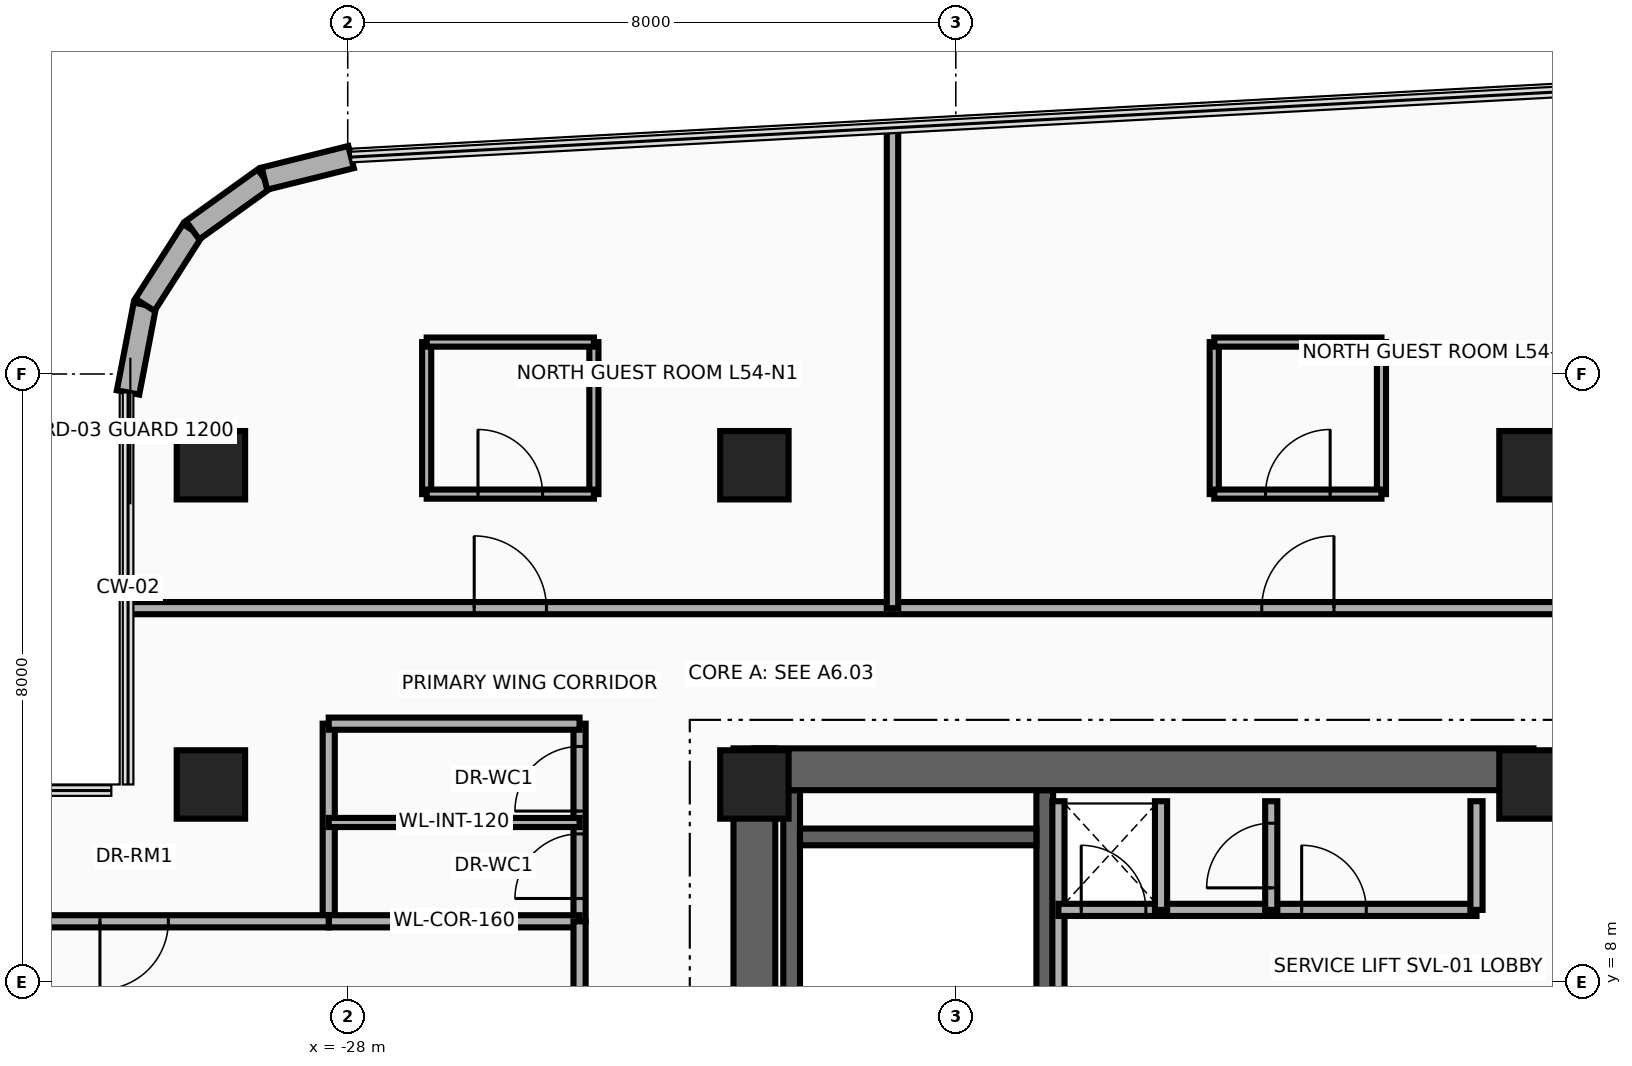
"""IFC4 building model, lengths in metres.
Left out: names, types, materials, properties, quantities, classifications, styles, units other than length and angle.
Written with IfcOpenShell. Run it as: python <this file> out.ifc"""

import sys

from ifc_helpers import new_model, si_unit, direction, frame, frame_2d, origin, origin_2d, place, context, subcontext, project, spatial, rectangle, extrude, source, transform, mapped, element, fill, save


model = new_model("IFC4")
c1 = context("Model", 3, precision=1e-05, world=origin(), true_north=direction((0.0, 1.0)))
c2 = subcontext(c1, "Body", "Model", "MODEL_VIEW")
j1 = project(units=[si_unit("LENGTHUNIT", "METRE"), si_unit("PLANEANGLEUNIT", "RADIAN")], contexts=[c1])
p1 = place(None, origin())
s1 = spatial("IfcSite", under=j1, at=p1, CompositionType="ELEMENT")
p2 = place(p1, origin())
s2 = spatial("IfcBuilding", under=s1, at=p2, CompositionType="ELEMENT")
p3 = place(p2, frame((0.0, 0.0, 212.5)))
s3 = spatial("IfcBuildingStorey", under=s2, at=p3, CompositionType="ELEMENT", Elevation=212.5)
for number, where, z_axis, x_axis in (
    (1, (-22.16, 1.78, 0.0), (0.0, 0.0, 1.0), (0.0, 1.0, 0.0)),
    (2, (-18.83, 1.78, 0.0), (0.0, 0.0, 1.0), (0.0, 1.0, 0.0)),
):
    element("IfcWall", number, at=place(p3, frame(where, z_axis=z_axis, x_axis=x_axis)), inside=s3, PredefinedType="SHEAR", context=c2, shape_type="SweptSolid", body=[
        extrude(rectangle(XDim=8.745, YDim=0.22, at=frame_2d((4.373, 0.0))), origin(), (0.0, 0.0, 1.0), 3.26),
    ])
p4 = place(p3, frame((-22.05, 9.91, 0.0), z_axis=(0.0, 0.0, 1.0), x_axis=(1.0, 0.0, 0.0)))
e3 = element("IfcWall", 3, at=p4, inside=s3, PredefinedType="SHEAR", context=c2, shape_type="SweptSolid", body=[
    extrude(rectangle(XDim=3.11, YDim=0.22, at=frame_2d((1.555, 0.0))), origin(), (0.0, 0.0, 1.0), 3.26),
])
p5 = place(p3, frame((-22.65, -11.075, 0.0), z_axis=(0.0, 0.0, 1.0), x_axis=(0.0, 1.0, 0.0)))
e4 = element("IfcWall", 4, at=p5, inside=s3, PredefinedType="SHEAR", context=c2, shape_type="SweptSolid", body=[
    extrude(rectangle(XDim=22.15, YDim=0.55, at=frame_2d((11.075, 0.0))), origin(), (0.0, 0.0, 1.0), 3.26),
])
p6 = place(p3, frame((-22.65, 10.8, 0.0), z_axis=(0.0, 0.0, 1.0), x_axis=(1.0, 0.0, 0.0)))
e5 = element("IfcWall", 5, at=p6, inside=s3, PredefinedType="SHEAR", context=c2, shape_type="SweptSolid", body=[
    extrude(rectangle(XDim=10.25, YDim=0.55, at=frame_2d((5.125, 0.0))), origin(), (0.0, 0.0, 1.0), 3.26),
])
m1 = source(origin(), c2, "Body", "SweptSolid", [
    extrude(rectangle(XDim=0.9, YDim=0.9, at=origin_2d()), origin(), (0.0, 0.0, 1.0), 3.5),
])
for number, where, z_axis, x_axis in (
    (6, (-29.8, 10.6, 0.0), (0.0, 0.0, 1.0), (1.0, 0.0, 0.0)),
    (7, (-22.65, 10.6, 0.0), (0.0, 0.0, 1.0), (1.0, 0.0, 0.0)),
    (8, (-12.4, 10.6, 0.0), (0.0, 0.0, 1.0), (1.0, 0.0, 0.0)),
    (9, (-29.8, 14.8, 0.0), (0.0, 0.0, 1.0), (1.0, 0.0, 0.0)),
    (10, (-22.65, 14.8, 0.0), (0.0, 0.0, 1.0), (1.0, 0.0, 0.0)),
    (11, (-12.4, 14.8, 0.0), (0.0, 0.0, 1.0), (1.0, 0.0, 0.0)),
):
    element("IfcColumn", number, at=place(p3, frame(where, z_axis=z_axis, x_axis=x_axis)), inside=s3, PredefinedType="COLUMN", context=c2, shape_type="MappedRepresentation", body=[
        mapped(m1, transform((0.0, 0.0, 0.0), x_axis=(1.0, 0.0, 0.0), y_axis=(0.0, 1.0, 0.0), z_axis=(0.0, 0.0, 1.0), scale=1.0)),
    ])
p7 = place(p3, frame((-30.89, 15.758, 0.0), z_axis=(0.0, 0.0, 1.0), x_axis=(0.18831542659, 0.982108598938, 0.0)))
e12 = element("IfcWall", 12, at=p7, inside=s3, PredefinedType="SOLIDWALL", context=c2, shape_type="SweptSolid", body=[
    extrude(rectangle(XDim=1.175, YDim=0.3, at=frame_2d((0.587, 0.0))), origin(), (0.0, 0.0, 1.0), 3.26),
])
p8 = place(p3, frame((-30.669, 16.911, 0.0), z_axis=(0.0, 0.0, 1.0), x_axis=(0.538678781902, 0.84251122837, 0.0)))
e13 = element("IfcWall", 13, at=p8, inside=s3, PredefinedType="SOLIDWALL", context=c2, shape_type="SweptSolid", body=[
    extrude(rectangle(XDim=1.164, YDim=0.3, at=frame_2d((0.582, 0.0))), origin(), (0.0, 0.0, 1.0), 3.26),
])
p9 = place(p3, frame((-30.042, 17.892, 0.0), z_axis=(0.0, 0.0, 1.0), x_axis=(0.812313539683, 0.583220981487, 0.0)))
e14 = element("IfcWall", 14, at=p9, inside=s3, PredefinedType="SOLIDWALL", context=c2, shape_type="SweptSolid", body=[
    extrude(rectangle(XDim=1.164, YDim=0.3, at=frame_2d((0.582, 0.0))), origin(), (0.0, 0.0, 1.0), 3.26),
])
p10 = place(p3, frame((-29.096, 18.571, 0.0), z_axis=(0.0, 0.0, 1.0), x_axis=(0.97050812798, 0.241068400098, 0.0)))
e15 = element("IfcWall", 15, at=p10, inside=s3, PredefinedType="SOLIDWALL", context=c2, shape_type="SweptSolid", body=[
    extrude(rectangle(XDim=1.175, YDim=0.3, at=frame_2d((0.587, 0.0))), origin(), (0.0, 0.0, 1.0), 3.26),
])
p11 = place(p3, frame((-18.65, 7.45, 0.0), z_axis=(0.0, 0.0, 1.0), x_axis=(0.0, 1.0, 0.0)))
e16 = element("IfcWall", 16, at=p11, inside=s3, PredefinedType="PARTITIONING", context=c2, shape_type="SweptSolid", body=[
    extrude(rectangle(XDim=2.93, YDim=0.16, at=frame_2d((1.465, 0.0))), origin(), (0.0, 0.0, 1.0), 3.26),
])
p12 = place(p3, frame((-18.65, 8.95, 0.0), z_axis=(0.0, 0.0, 1.0), x_axis=(1.0, 0.0, 0.0)))
e17 = element("IfcWall", 17, at=p12, inside=s3, PredefinedType="PARTITIONING", context=c2, shape_type="SweptSolid", body=[
    extrude(rectangle(XDim=5.5, YDim=0.16, at=frame_2d((2.75, 0.0))), origin(), (0.0, 0.0, 1.0), 3.26),
])
p13 = place(p12, frame((0.3, 0.0, 0.0)))
e18 = element("IfcOpeningElement", 18, at=p13, cuts=e17, PredefinedType="OPENING", context=c2, shape_type="SweptSolid", body=[
    extrude(rectangle(XDim=0.85, YDim=2.05, at=frame_2d((0.425, 1.025))), frame((0.0, 0.095, 0.0), z_axis=(0.0, -1.0, 0.0), x_axis=(1.0, 0.0, 0.0)), (0.0, 0.0, 1.0), 0.19),
])
p14 = place(p12, frame((3.2, 0.0, 0.0)))
e19 = element("IfcOpeningElement", 19, at=p14, cuts=e17, PredefinedType="OPENING", context=c2, shape_type="SweptSolid", body=[
    extrude(rectangle(XDim=0.85, YDim=2.05, at=frame_2d((0.425, 1.025))), frame((0.0, 0.095, 0.0), z_axis=(0.0, -1.0, 0.0), x_axis=(1.0, 0.0, 0.0)), (0.0, 0.0, 1.0), 0.19),
])
for number, where, z_axis, x_axis in (
    (20, (-13.15, 8.95, 0.0), (0.0, 0.0, 1.0), (0.0, 1.0, 0.0)),
    (21, (-17.3, 8.95, 0.0), (0.0, 0.0, 1.0), (0.0, 1.0, 0.0)),
):
    element("IfcWall", number, at=place(p3, frame(where, z_axis=z_axis, x_axis=x_axis)), inside=s3, PredefinedType="PARTITIONING", context=c2, shape_type="SweptSolid", body=[
        extrude(rectangle(XDim=1.43, YDim=0.16, at=frame_2d((0.715, 0.0))), origin(), (0.0, 0.0, 1.0), 3.26),
    ])
p15 = place(p3, frame((-15.85, 8.95, 0.0), z_axis=(0.0, 0.0, 1.0), x_axis=(0.0, 1.0, 0.0)))
e22 = element("IfcWall", 22, at=p15, inside=s3, PredefinedType="PARTITIONING", context=c2, shape_type="SweptSolid", body=[
    extrude(rectangle(XDim=1.43, YDim=0.16, at=frame_2d((0.715, 0.0))), origin(), (0.0, 0.0, 1.0), 3.26),
])
p16 = place(p15, frame((0.29, 0.0, 0.0)))
e23 = element("IfcOpeningElement", 23, at=p16, cuts=e22, PredefinedType="OPENING", context=c2, shape_type="SweptSolid", body=[
    extrude(rectangle(XDim=0.85, YDim=2.05, at=frame_2d((0.425, 1.025))), frame((0.0, 0.095, 0.0), z_axis=(0.0, -1.0, 0.0), x_axis=(1.0, 0.0, 0.0)), (0.0, 0.0, 1.0), 0.19),
])
p17 = place(p3, frame((-28.25, 8.8, 0.0), z_axis=(0.0, 0.0, 1.0), x_axis=(0.0, 1.0, 0.0)))
e24 = element("IfcWall", 24, at=p17, inside=s3, PredefinedType="PARTITIONING", context=c2, shape_type="SweptSolid", body=[
    extrude(rectangle(XDim=2.6, YDim=0.16, at=frame_2d((1.3, 0.0))), origin(), (0.0, 0.0, 1.0), 2.544),
])
p18 = place(p3, frame((-24.95, 8.8, 0.0), z_axis=(0.0, 0.0, 1.0), x_axis=(0.0, 1.0, 0.0)))
e25 = element("IfcWall", 25, at=p18, inside=s3, PredefinedType="PARTITIONING", context=c2, shape_type="SweptSolid", body=[
    extrude(rectangle(XDim=2.6, YDim=0.16, at=frame_2d((1.3, 0.0))), origin(), (0.0, 0.0, 1.0), 2.544),
])
p19 = place(p18, frame((0.3, 0.0, 0.0)))
e26 = element("IfcOpeningElement", 26, at=p19, cuts=e25, PredefinedType="OPENING", context=c2, shape_type="SweptSolid", body=[
    extrude(rectangle(XDim=0.85, YDim=2.1, at=frame_2d((0.425, 1.05))), frame((0.0, 0.095, 0.0), z_axis=(0.0, -1.0, 0.0), x_axis=(1.0, 0.0, 0.0)), (0.0, 0.0, 1.0), 0.19),
])
p20 = place(p18, frame((1.45, 0.0, 0.0)))
e27 = element("IfcOpeningElement", 27, at=p20, cuts=e25, PredefinedType="OPENING", context=c2, shape_type="SweptSolid", body=[
    extrude(rectangle(XDim=0.85, YDim=2.1, at=frame_2d((0.425, 1.05))), frame((0.0, 0.095, 0.0), z_axis=(0.0, -1.0, 0.0), x_axis=(1.0, 0.0, 0.0)), (0.0, 0.0, 1.0), 0.19),
])
for number, where, z_axis, x_axis in (
    (28, (-28.25, 8.8, 0.0), (0.0, 0.0, 1.0), (1.0, 0.0, 0.0)),
    (29, (-28.25, 11.4, 0.0), (0.0, 0.0, 1.0), (1.0, 0.0, 0.0)),
):
    element("IfcWall", number, at=place(p3, frame(where, z_axis=z_axis, x_axis=x_axis)), inside=s3, PredefinedType="PARTITIONING", context=c2, shape_type="SweptSolid", body=[
        extrude(rectangle(XDim=3.3, YDim=0.16, at=frame_2d((1.65, 0.0))), origin(), (0.0, 0.0, 1.0), 3.26),
    ])
p21 = place(p3, frame((-28.25, 10.1, 0.0), z_axis=(0.0, 0.0, 1.0), x_axis=(1.0, 0.0, 0.0)))
e30 = element("IfcWall", 30, at=p21, inside=s3, PredefinedType="PARTITIONING", context=c2, shape_type="SweptSolid", body=[
    extrude(rectangle(XDim=3.3, YDim=0.12, at=frame_2d((1.65, 0.0))), origin(), (0.0, 0.0, 1.0), 3.26),
])
p22 = place(p3, frame((-24.95, -11.42, 0.0), z_axis=(0.0, 0.0, 1.0), x_axis=(0.0, 1.0, 0.0)))
e31 = element("IfcWall", 31, at=p22, inside=s3, PredefinedType="PARTITIONING", context=c2, shape_type="SweptSolid", body=[
    extrude(rectangle(XDim=20.22, YDim=0.16, at=frame_2d((10.11, 0.0))), origin(), (0.0, 0.0, 1.0), 2.544),
])
p23 = place(p22, frame((1.142, 0.0, 0.0)))
e32 = element("IfcOpeningElement", 32, at=p23, cuts=e31, PredefinedType="OPENING", context=c2, shape_type="SweptSolid", body=[
    extrude(rectangle(XDim=0.95, YDim=2.15, at=frame_2d((0.475, 1.075))), frame((0.0, 0.095, 0.0), z_axis=(0.0, -1.0, 0.0), x_axis=(1.0, 0.0, 0.0)), (0.0, 0.0, 1.0), 0.19),
])
p24 = place(p22, frame((8.018, 0.0, 0.0)))
e33 = element("IfcOpeningElement", 33, at=p24, cuts=e31, PredefinedType="OPENING", context=c2, shape_type="SweptSolid", body=[
    extrude(rectangle(XDim=0.95, YDim=2.15, at=frame_2d((0.475, 1.075))), frame((0.0, 0.095, 0.0), z_axis=(0.0, -1.0, 0.0), x_axis=(1.0, 0.0, 0.0)), (0.0, 0.0, 1.0), 0.19),
])
p25 = place(p22, frame((11.252, 0.0, 0.0)))
e34 = element("IfcOpeningElement", 34, at=p25, cuts=e31, PredefinedType="OPENING", context=c2, shape_type="SweptSolid", body=[
    extrude(rectangle(XDim=0.95, YDim=2.15, at=frame_2d((0.475, 1.075))), frame((0.0, 0.095, 0.0), z_axis=(0.0, -1.0, 0.0), x_axis=(1.0, 0.0, 0.0)), (0.0, 0.0, 1.0), 0.19),
])
p26 = place(p22, frame((18.127, 0.0, 0.0)))
e35 = element("IfcOpeningElement", 35, at=p26, cuts=e31, PredefinedType="OPENING", context=c2, shape_type="SweptSolid", body=[
    extrude(rectangle(XDim=0.95, YDim=2.15, at=frame_2d((0.475, 1.075))), frame((0.0, 0.095, 0.0), z_axis=(0.0, -1.0, 0.0), x_axis=(1.0, 0.0, 0.0)), (0.0, 0.0, 1.0), 0.19),
])
p27 = place(p3, frame((-32.54, 8.8, 0.0), z_axis=(0.0, 0.0, 1.0), x_axis=(1.0, 0.0, 0.0)))
e36 = element("IfcWall", 36, at=p27, inside=s3, PredefinedType="PARTITIONING", context=c2, shape_type="SweptSolid", body=[
    extrude(rectangle(XDim=4.29, YDim=0.16, at=frame_2d((2.145, 0.0))), origin(), (0.0, 0.0, 1.0), 2.706),
])
p28 = place(p27, frame((1.28, 0.0, 0.0)))
e37 = element("IfcOpeningElement", 37, at=p28, cuts=e36, PredefinedType="OPENING", context=c2, shape_type="SweptSolid", body=[
    extrude(rectangle(XDim=0.9, YDim=2.1, at=frame_2d((0.45, 1.05))), frame((0.0, 0.095, 0.0), z_axis=(0.0, -1.0, 0.0), x_axis=(1.0, 0.0, 0.0)), (0.0, 0.0, 1.0), 0.19),
])
p29 = place(p3, frame((-30.89, 12.92, 0.0), z_axis=(0.0, 0.0, 1.0), x_axis=(1.0, 0.0, 0.0)))
e38 = element("IfcWall", 38, at=p29, inside=s3, PredefinedType="PARTITIONING", context=c2, shape_type="SweptSolid", body=[
    extrude(rectangle(XDim=31.28, YDim=0.16, at=frame_2d((15.64, 0.0))), origin(), (0.0, 0.0, 1.0), 2.634),
])
p30 = place(p29, frame((4.554, 0.0, 0.0)))
e39 = element("IfcOpeningElement", 39, at=p30, cuts=e38, PredefinedType="OPENING", context=c2, shape_type="SweptSolid", body=[
    extrude(rectangle(XDim=0.95, YDim=2.15, at=frame_2d((0.475, 1.075))), frame((0.0, 0.095, 0.0), z_axis=(0.0, -1.0, 0.0), x_axis=(1.0, 0.0, 0.0)), (0.0, 0.0, 1.0), 0.19),
])
p31 = place(p29, frame((14.915, 0.0, 0.0)))
e40 = element("IfcOpeningElement", 40, at=p31, cuts=e38, PredefinedType="OPENING", context=c2, shape_type="SweptSolid", body=[
    extrude(rectangle(XDim=0.95, YDim=2.15, at=frame_2d((0.475, 1.075))), frame((0.0, 0.095, 0.0), z_axis=(0.0, -1.0, 0.0), x_axis=(1.0, 0.0, 0.0)), (0.0, 0.0, 1.0), 0.19),
])
p32 = place(p29, frame((26.627, 0.0, 0.0)))
e41 = element("IfcOpeningElement", 41, at=p32, cuts=e38, PredefinedType="OPENING", context=c2, shape_type="SweptSolid", body=[
    extrude(rectangle(XDim=0.95, YDim=2.15, at=frame_2d((0.475, 1.075))), frame((0.0, 0.095, 0.0), z_axis=(0.0, -1.0, 0.0), x_axis=(1.0, 0.0, 0.0)), (0.0, 0.0, 1.0), 0.19),
])
p33 = place(p3, frame((-20.833, 12.92, 0.0), z_axis=(0.0, 0.0, 1.0), x_axis=(0.0, 1.0, 0.0)))
e42 = element("IfcWall", 42, at=p33, inside=s3, PredefinedType="PARTITIONING", context=c2, shape_type="SweptSolid", body=[
    extrude(rectangle(XDim=6.319, YDim=0.15, at=frame_2d((3.159, 0.0))), origin(), (0.0, 0.0, 1.0), 2.544),
])
for number, where, z_axis, x_axis in (
    (43, (-26.961, 14.42, 0.0), (0.0, 0.0, 1.0), (0.0, 1.0, 0.0)),
    (44, (-24.761, 14.42, 0.0), (0.0, 0.0, 1.0), (0.0, 1.0, 0.0)),
):
    element("IfcWall", number, at=place(p3, frame(where, z_axis=z_axis, x_axis=x_axis)), inside=s3, PredefinedType="PARTITIONING", context=c2, shape_type="SweptSolid", body=[
        extrude(rectangle(XDim=2.0, YDim=0.12, at=frame_2d((1.0, 0.0))), origin(), (0.0, 0.0, 1.0), 2.544),
    ])
p34 = place(p3, frame((-26.961, 16.42, 0.0), z_axis=(0.0, 0.0, 1.0), x_axis=(1.0, 0.0, 0.0)))
e45 = element("IfcWall", 45, at=p34, inside=s3, PredefinedType="PARTITIONING", context=c2, shape_type="SweptSolid", body=[
    extrude(rectangle(XDim=2.2, YDim=0.12, at=frame_2d((1.1, 0.0))), origin(), (0.0, 0.0, 1.0), 3.26),
])
p35 = place(p3, frame((-26.961, 14.42, 0.0), z_axis=(0.0, 0.0, 1.0), x_axis=(1.0, 0.0, 0.0)))
e46 = element("IfcWall", 46, at=p35, inside=s3, PredefinedType="PARTITIONING", context=c2, shape_type="SweptSolid", body=[
    extrude(rectangle(XDim=2.2, YDim=0.12, at=frame_2d((1.1, 0.0))), origin(), (0.0, 0.0, 1.0), 3.26),
])
p36 = place(p35, frame((0.675, 0.0, 0.0)))
e47 = element("IfcOpeningElement", 47, at=p36, cuts=e46, PredefinedType="OPENING", context=c2, shape_type="SweptSolid", body=[
    extrude(rectangle(XDim=0.85, YDim=2.1, at=frame_2d((0.425, 1.05))), frame((0.0, 0.075, 0.0), z_axis=(0.0, -1.0, 0.0), x_axis=(1.0, 0.0, 0.0)), (0.0, 0.0, 1.0), 0.15),
])
for number, where, z_axis, x_axis in (
    (48, (-16.6, 14.42, 0.0), (0.0, 0.0, 1.0), (0.0, 1.0, 0.0)),
    (49, (-14.4, 14.42, 0.0), (0.0, 0.0, 1.0), (0.0, 1.0, 0.0)),
):
    element("IfcWall", number, at=place(p3, frame(where, z_axis=z_axis, x_axis=x_axis)), inside=s3, PredefinedType="PARTITIONING", context=c2, shape_type="SweptSolid", body=[
        extrude(rectangle(XDim=2.0, YDim=0.12, at=frame_2d((1.0, 0.0))), origin(), (0.0, 0.0, 1.0), 2.544),
    ])
p37 = place(p3, frame((-16.6, 16.42, 0.0), z_axis=(0.0, 0.0, 1.0), x_axis=(1.0, 0.0, 0.0)))
e50 = element("IfcWall", 50, at=p37, inside=s3, PredefinedType="PARTITIONING", context=c2, shape_type="SweptSolid", body=[
    extrude(rectangle(XDim=2.2, YDim=0.12, at=frame_2d((1.1, 0.0))), origin(), (0.0, 0.0, 1.0), 3.26),
])
p38 = place(p3, frame((-16.6, 14.42, 0.0), z_axis=(0.0, 0.0, 1.0), x_axis=(1.0, 0.0, 0.0)))
e51 = element("IfcWall", 51, at=p38, inside=s3, PredefinedType="PARTITIONING", context=c2, shape_type="SweptSolid", body=[
    extrude(rectangle(XDim=2.2, YDim=0.12, at=frame_2d((1.1, 0.0))), origin(), (0.0, 0.0, 1.0), 3.26),
])
p39 = place(p38, frame((0.675, 0.0, 0.0)))
e52 = element("IfcOpeningElement", 52, at=p39, cuts=e51, PredefinedType="OPENING", context=c2, shape_type="SweptSolid", body=[
    extrude(rectangle(XDim=0.85, YDim=2.1, at=frame_2d((0.425, 1.05))), frame((0.0, 0.075, 0.0), z_axis=(0.0, -1.0, 0.0), x_axis=(1.0, 0.0, 0.0)), (0.0, 0.0, 1.0), 0.15),
])
p40 = place(p13, origin())
e53 = element("IfcDoor", 53, at=p40, inside=s3, OperationType="SINGLE_SWING_LEFT", PredefinedType="DOOR", context=c2, shape_type="SweptSolid", body=[
    extrude(rectangle(XDim=0.85, YDim=2.05, at=frame_2d((0.425, 1.025))), frame((0.0, 0.025, 0.0), z_axis=(0.0, -1.0, 0.0), x_axis=(1.0, 0.0, 0.0)), (0.0, 0.0, 1.0), 0.05),
])
fill(e18, e53)
p41 = place(p14, origin())
e54 = element("IfcDoor", 54, at=p41, inside=s3, OperationType="SINGLE_SWING_RIGHT", PredefinedType="DOOR", context=c2, shape_type="SweptSolid", body=[
    extrude(rectangle(XDim=0.85, YDim=2.05, at=frame_2d((0.425, 1.025))), frame((0.0, 0.025, 0.0), z_axis=(0.0, -1.0, 0.0), x_axis=(1.0, 0.0, 0.0)), (0.0, 0.0, 1.0), 0.05),
])
fill(e19, e54)
p42 = place(p16, origin())
e55 = element("IfcDoor", 55, at=p42, inside=s3, OperationType="SINGLE_SWING_LEFT", PredefinedType="DOOR", context=c2, shape_type="SweptSolid", body=[
    extrude(rectangle(XDim=0.85, YDim=2.05, at=frame_2d((0.425, 1.025))), frame((0.0, 0.025, 0.0), z_axis=(0.0, -1.0, 0.0), x_axis=(1.0, 0.0, 0.0)), (0.0, 0.0, 1.0), 0.05),
])
fill(e23, e55)
p43 = place(p19, origin())
e56 = element("IfcDoor", 56, at=p43, inside=s3, OperationType="SINGLE_SWING_LEFT", PredefinedType="DOOR", context=c2, shape_type="SweptSolid", body=[
    extrude(rectangle(XDim=0.85, YDim=2.1, at=frame_2d((0.425, 1.05))), frame((0.0, 0.025, 0.0), z_axis=(0.0, -1.0, 0.0), x_axis=(1.0, 0.0, 0.0)), (0.0, 0.0, 1.0), 0.05),
])
fill(e26, e56)
p44 = place(p20, origin())
e57 = element("IfcDoor", 57, at=p44, inside=s3, OperationType="SINGLE_SWING_RIGHT", PredefinedType="DOOR", context=c2, shape_type="SweptSolid", body=[
    extrude(rectangle(XDim=0.85, YDim=2.1, at=frame_2d((0.425, 1.05))), frame((0.0, 0.025, 0.0), z_axis=(0.0, -1.0, 0.0), x_axis=(1.0, 0.0, 0.0)), (0.0, 0.0, 1.0), 0.05),
])
fill(e27, e57)
p45 = place(p28, frame((0.9, 0.0, 0.0), z_axis=(0.0, 0.0, 1.0), x_axis=(-1.0, 0.0, 0.0)))
e58 = element("IfcDoor", 58, at=p45, inside=s3, OperationType="SINGLE_SWING_LEFT", PredefinedType="DOOR", context=c2, shape_type="SweptSolid", body=[
    extrude(rectangle(XDim=0.9, YDim=2.1, at=frame_2d((0.45, 1.05))), frame((0.0, 0.025, 0.0), z_axis=(0.0, -1.0, 0.0), x_axis=(1.0, 0.0, 0.0)), (0.0, 0.0, 1.0), 0.05),
])
fill(e37, e58)
p46 = place(p30, origin())
e59 = element("IfcDoor", 59, at=p46, inside=s3, OperationType="SINGLE_SWING_RIGHT", PredefinedType="DOOR", context=c2, shape_type="SweptSolid", body=[
    extrude(rectangle(XDim=0.95, YDim=2.15, at=frame_2d((0.475, 1.075))), frame((0.0, 0.025, 0.0), z_axis=(0.0, -1.0, 0.0), x_axis=(1.0, 0.0, 0.0)), (0.0, 0.0, 1.0), 0.05),
])
fill(e39, e59)
p47 = place(p36, origin())
e60 = element("IfcDoor", 60, at=p47, inside=s3, OperationType="SINGLE_SWING_LEFT", PredefinedType="DOOR", context=c2, shape_type="SweptSolid", body=[
    extrude(rectangle(XDim=0.85, YDim=2.1, at=frame_2d((0.425, 1.05))), frame((0.0, 0.025, 0.0), z_axis=(0.0, -1.0, 0.0), x_axis=(1.0, 0.0, 0.0)), (0.0, 0.0, 1.0), 0.05),
])
fill(e47, e60)
p48 = place(p31, origin())
e61 = element("IfcDoor", 61, at=p48, inside=s3, OperationType="SINGLE_SWING_RIGHT", PredefinedType="DOOR", context=c2, shape_type="SweptSolid", body=[
    extrude(rectangle(XDim=0.95, YDim=2.15, at=frame_2d((0.475, 1.075))), frame((0.0, 0.025, 0.0), z_axis=(0.0, -1.0, 0.0), x_axis=(1.0, 0.0, 0.0)), (0.0, 0.0, 1.0), 0.05),
])
fill(e40, e61)
p49 = place(p39, origin())
e62 = element("IfcDoor", 62, at=p49, inside=s3, OperationType="SINGLE_SWING_LEFT", PredefinedType="DOOR", context=c2, shape_type="SweptSolid", body=[
    extrude(rectangle(XDim=0.85, YDim=2.1, at=frame_2d((0.425, 1.05))), frame((0.0, 0.025, 0.0), z_axis=(0.0, -1.0, 0.0), x_axis=(1.0, 0.0, 0.0)), (0.0, 0.0, 1.0), 0.05),
])
fill(e52, e62)
save(model, sys.argv[1])
